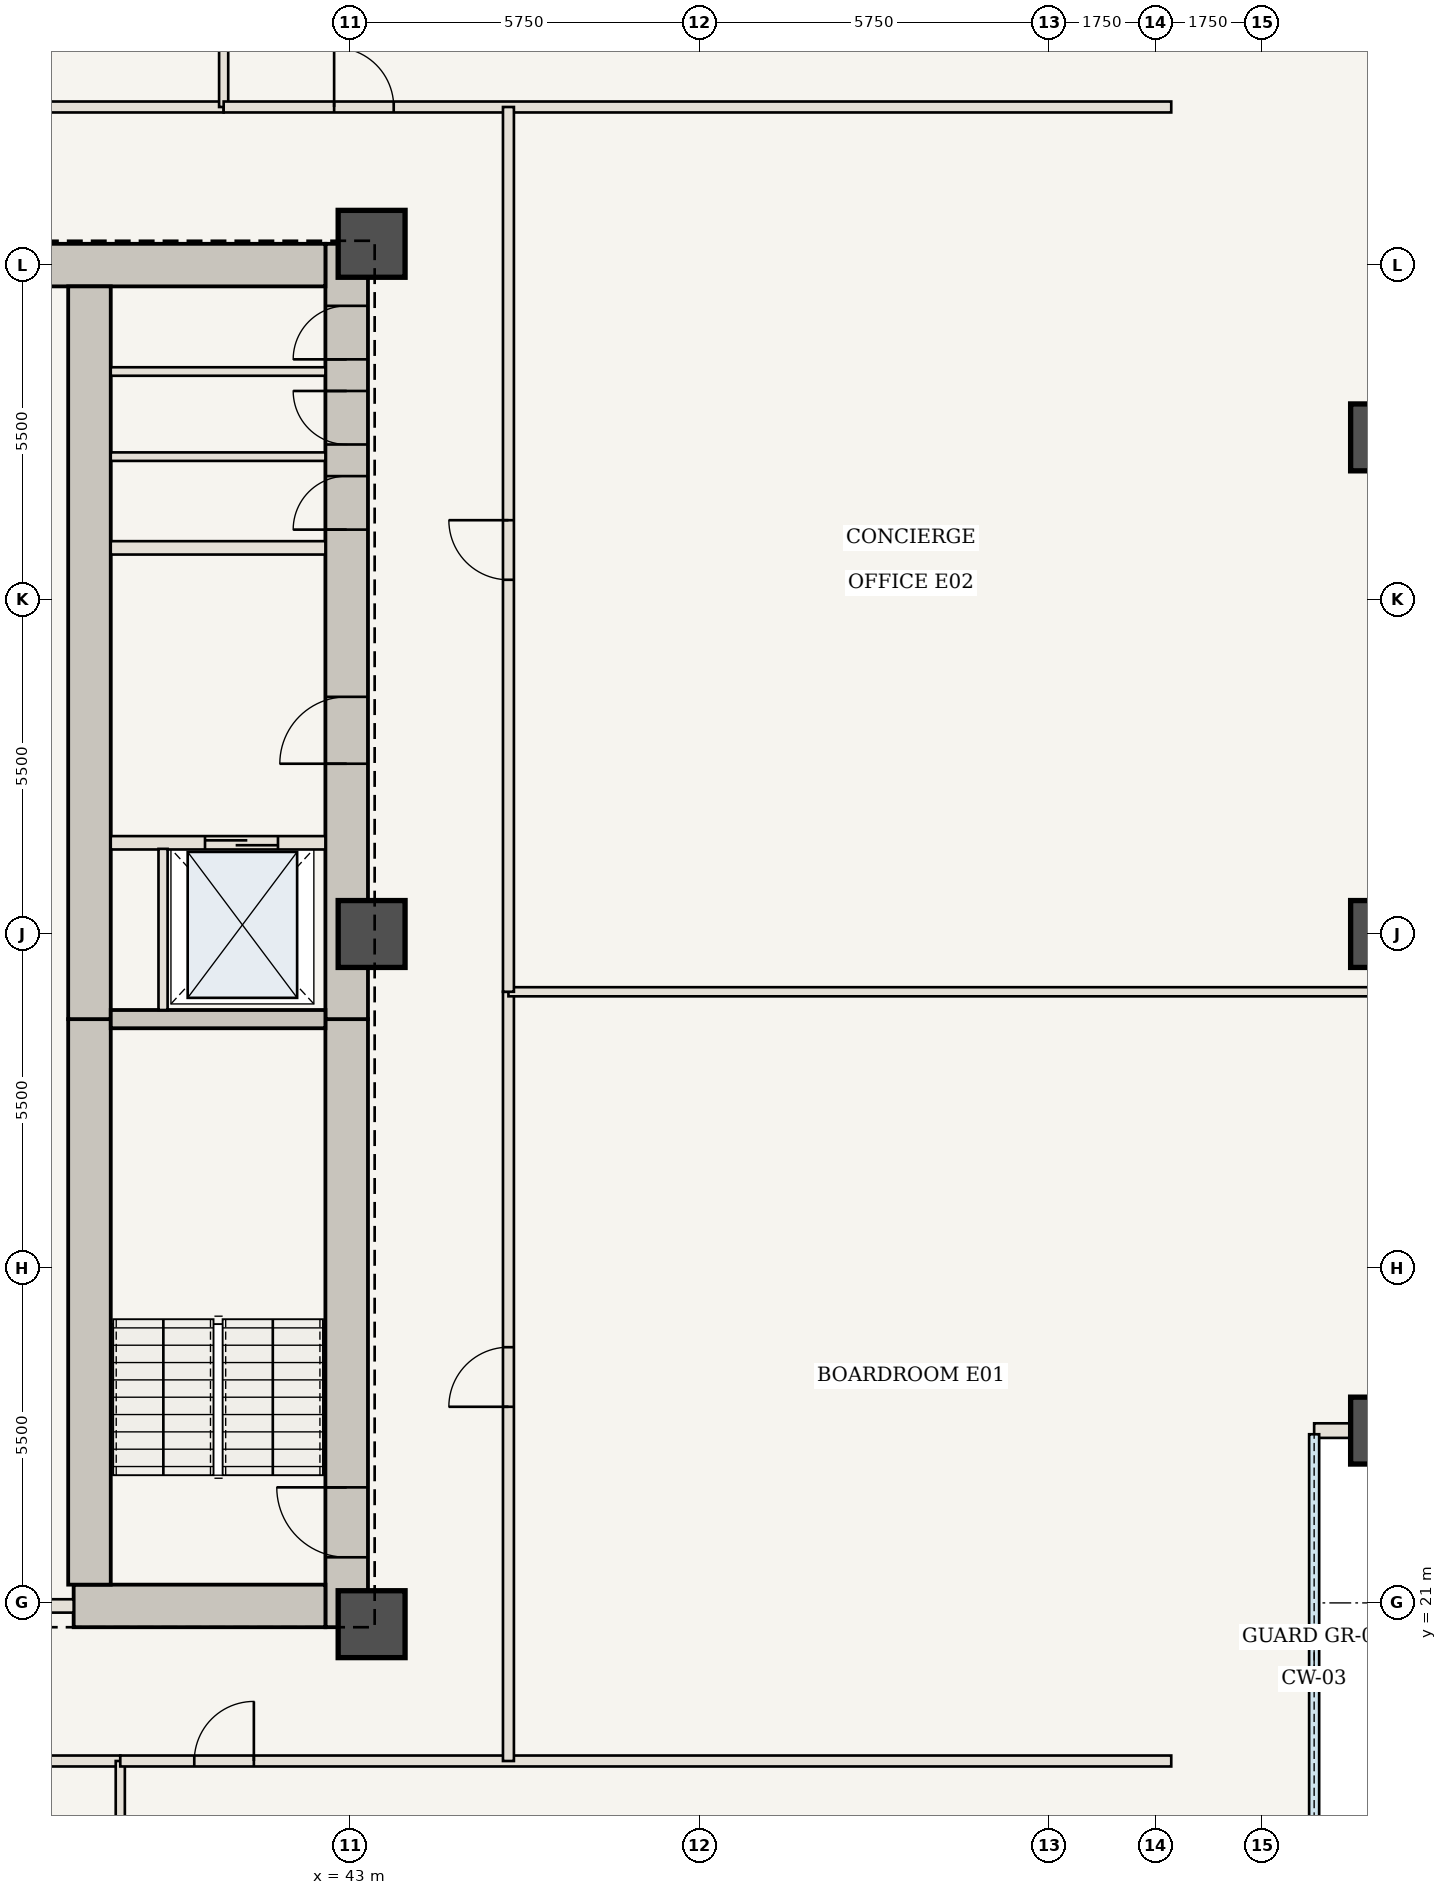
"""IFC4 building model, lengths in metres.
Left out: names, types, materials, properties, quantities, classifications, styles, units other than length and angle.
Written with IfcOpenShell. Run it as: python <this file> out.ifc"""

import sys

from ifc_helpers import new_model, si_unit, direction, frame, frame_2d, origin, origin_2d, place, context, subcontext, project, spatial, rectangle, extrude, element, fill, save


model = new_model("IFC4")
c1 = context("Model", 3, precision=1e-05, world=origin(), true_north=direction((0.0, 1.0)))
c2 = subcontext(c1, "Body", "Model", "MODEL_VIEW")
j1 = project(units=[si_unit("LENGTHUNIT", "METRE"), si_unit("PLANEANGLEUNIT", "RADIAN")], contexts=[c1])
p1 = place(None, origin())
s1 = spatial("IfcSite", under=j1, at=p1, CompositionType="ELEMENT")
p2 = place(p1, origin())
s2 = spatial("IfcBuilding", under=s1, at=p2, CompositionType="ELEMENT")
p3 = place(p2, frame((0.0, 0.0, 96.25)))
s3 = spatial("IfcBuildingStorey", under=s2, at=p3, CompositionType="ELEMENT", Elevation=96.25)
p4 = place(p3, frame((42.94, 20.6, 0.0), z_axis=(0.0, 0.0, 1.0), x_axis=(0.0, 1.0, 0.0)))
e1 = element("IfcWall", 1, at=p4, inside=s3, PredefinedType="SHEAR", context=c2, shape_type="SweptSolid", body=[
    extrude(rectangle(XDim=10.0, YDim=0.7, at=frame_2d((5.0, 0.0))), origin(), (0.0, 0.0, 1.0), 3.5),
])
p5 = place(p4, frame((1.15, 0.0, 0.0)))
e2 = element("IfcOpeningElement", 2, at=p5, cuts=e1, PredefinedType="OPENING", context=c2, shape_type="SweptSolid", body=[
    extrude(rectangle(XDim=1.15, YDim=2.15, at=frame_2d((0.575, 1.075))), frame((0.0, 0.36, 0.0), z_axis=(0.0, -1.0, 0.0), x_axis=(1.0, 0.0, 0.0)), (0.0, 0.0, 1.0), 0.72),
])
p6 = place(p3, frame((42.94, 30.6, 0.0), z_axis=(0.0, 0.0, 1.0), x_axis=(0.0, 1.0, 0.0)))
e3 = element("IfcWall", 3, at=p6, inside=s3, PredefinedType="SHEAR", context=c2, shape_type="SweptSolid", body=[
    extrude(rectangle(XDim=12.75, YDim=0.7, at=frame_2d((6.375, 0.0))), origin(), (0.0, 0.0, 1.0), 3.5),
])
p7 = place(p6, frame((4.2, 0.0, 0.0)))
e4 = element("IfcOpeningElement", 4, at=p7, cuts=e3, PredefinedType="OPENING", context=c2, shape_type="SweptSolid", body=[
    extrude(rectangle(XDim=1.1, YDim=2.15, at=frame_2d((0.55, 1.075))), frame((0.0, 0.36, 0.0), z_axis=(0.0, -1.0, 0.0), x_axis=(1.0, 0.0, 0.0)), (0.0, 0.0, 1.0), 0.72),
])
p8 = place(p6, frame((8.05, 0.0, 0.0)))
e5 = element("IfcOpeningElement", 5, at=p8, cuts=e3, PredefinedType="OPENING", context=c2, shape_type="SweptSolid", body=[
    extrude(rectangle(XDim=0.88, YDim=2.1, at=frame_2d((0.44, 1.05))), frame((0.0, 0.36, 0.0), z_axis=(0.0, -1.0, 0.0), x_axis=(1.0, 0.0, 0.0)), (0.0, 0.0, 1.0), 0.72),
])
p9 = place(p6, frame((9.45, 0.0, 0.0)))
e6 = element("IfcOpeningElement", 6, at=p9, cuts=e3, PredefinedType="OPENING", context=c2, shape_type="SweptSolid", body=[
    extrude(rectangle(XDim=0.88, YDim=2.1, at=frame_2d((0.44, 1.05))), frame((0.0, 0.36, 0.0), z_axis=(0.0, -1.0, 0.0), x_axis=(1.0, 0.0, 0.0)), (0.0, 0.0, 1.0), 0.72),
])
p10 = place(p6, frame((10.85, 0.0, 0.0)))
e7 = element("IfcOpeningElement", 7, at=p10, cuts=e3, PredefinedType="OPENING", context=c2, shape_type="SweptSolid", body=[
    extrude(rectangle(XDim=0.88, YDim=2.1, at=frame_2d((0.44, 1.05))), frame((0.0, 0.36, 0.0), z_axis=(0.0, -1.0, 0.0), x_axis=(1.0, 0.0, 0.0)), (0.0, 0.0, 1.0), 0.72),
])
p11 = place(p3, frame((38.45, 20.95, 0.0), z_axis=(0.0, 0.0, 1.0), x_axis=(1.0, 0.0, 0.0)))
e8 = element("IfcWall", 8, at=p11, inside=s3, PredefinedType="SHEAR", context=c2, shape_type="SweptSolid", body=[
    extrude(rectangle(XDim=4.14, YDim=0.7, at=frame_2d((2.07, 0.0))), origin(), (0.0, 0.0, 1.0), 3.5),
])
p12 = place(p3, frame((37.75, 43.0, 0.0), z_axis=(0.0, 0.0, 1.0), x_axis=(1.0, 0.0, 0.0)))
e9 = element("IfcWall", 9, at=p12, inside=s3, PredefinedType="SHEAR", context=c2, shape_type="SweptSolid", body=[
    extrude(rectangle(XDim=4.84, YDim=0.7, at=frame_2d((2.42, 0.0))), origin(), (0.0, 0.0, 1.0), 3.5),
])
p13 = place(p3, frame((38.71, 21.3, 0.0), z_axis=(0.0, 0.0, 1.0), x_axis=(0.0, 1.0, 0.0)))
e10 = element("IfcWall", 10, at=p13, inside=s3, PredefinedType="SHEAR", context=c2, shape_type="SweptSolid", body=[
    extrude(rectangle(XDim=9.3, YDim=0.7, at=frame_2d((4.65, 0.0))), origin(), (0.0, 0.0, 1.0), 3.5),
])
p14 = place(p3, frame((38.71, 30.6, 0.0), z_axis=(0.0, 0.0, 1.0), x_axis=(0.0, 1.0, 0.0)))
e11 = element("IfcWall", 11, at=p14, inside=s3, PredefinedType="SHEAR", context=c2, shape_type="SweptSolid", body=[
    extrude(rectangle(XDim=12.05, YDim=0.7, at=frame_2d((6.025, 0.0))), origin(), (0.0, 0.0, 1.0), 3.5),
])
for number, where, z_axis, x_axis in (
    (12, (43.35, 20.65, 0.0), (0.0, 0.0, 1.0), (1.0, 0.0, 0.0)),
    (13, (43.35, 32.0, 0.0), (0.0, 0.0, 1.0), (1.0, 0.0, 0.0)),
    (14, (43.35, 43.35, 0.0), (0.0, 0.0, 1.0), (1.0, 0.0, 0.0)),
    (15, (60.0, 23.833, 0.0), (0.0, 0.0, 1.0), (1.0, 0.0, 0.0)),
    (16, (60.0, 32.0, 0.0), (0.0, 0.0, 1.0), (1.0, 0.0, 0.0)),
    (17, (60.0, 40.167, 0.0), (0.0, 0.0, 1.0), (1.0, 0.0, 0.0)),
):
    element("IfcColumn", number, at=place(p3, frame(where, z_axis=z_axis, x_axis=x_axis)), inside=s3, PredefinedType="COLUMN", context=c2, shape_type="SweptSolid", body=[
        extrude(rectangle(XDim=1.1, YDim=1.1, at=origin_2d()), origin(), (0.0, 0.0, 1.0), 3.5),
    ])
p15 = place(p3, frame((39.06, 30.6, 0.0), z_axis=(0.0, 0.0, 1.0), x_axis=(1.0, 0.0, 0.0)))
e18 = element("IfcWall", 18, at=p15, inside=s3, PredefinedType="SHEAR", context=c2, shape_type="SweptSolid", body=[
    extrude(rectangle(XDim=3.53, YDim=0.3, at=frame_2d((1.765, 0.0))), origin(), (0.0, 0.0, 1.0), 3.08),
])
p16 = place(p3, frame((39.06, 33.5, 0.0), z_axis=(0.0, 0.0, 1.0), x_axis=(1.0, 0.0, 0.0)))
e19 = element("IfcWall", 19, at=p16, inside=s3, PredefinedType="STANDARD", context=c2, shape_type="SweptSolid", body=[
    extrude(rectangle(XDim=3.53, YDim=0.22, at=frame_2d((1.765, 0.0))), origin(), (0.0, 0.0, 1.0), 3.08),
])
p17 = place(p16, frame((1.55, 0.0, 0.0)))
e20 = element("IfcOpeningElement", 20, at=p17, cuts=e19, PredefinedType="OPENING", context=c2, shape_type="SweptSolid", body=[
    extrude(rectangle(XDim=1.2, YDim=2.2, at=frame_2d((0.6, 1.1))), frame((0.0, 0.12, 0.0), z_axis=(0.0, -1.0, 0.0), x_axis=(1.0, 0.0, 0.0)), (0.0, 0.0, 1.0), 0.24),
])
p18 = place(p3, frame((39.92, 30.75, 0.0), z_axis=(0.0, 0.0, 1.0), x_axis=(0.0, 1.0, 0.0)))
e21 = element("IfcWall", 21, at=p18, inside=s3, PredefinedType="STANDARD", context=c2, shape_type="SweptSolid", body=[
    extrude(rectangle(XDim=2.65, YDim=0.15, at=frame_2d((1.325, 0.0))), origin(), (0.0, 0.0, 1.0), 3.08),
])
p19 = place(p3, frame((39.06, 38.35, 0.0), z_axis=(0.0, 0.0, 1.0), x_axis=(1.0, 0.0, 0.0)))
e22 = element("IfcWall", 22, at=p19, inside=s3, PredefinedType="STANDARD", context=c2, shape_type="SweptSolid", body=[
    extrude(rectangle(XDim=3.53, YDim=0.22, at=frame_2d((1.765, 0.0))), origin(), (0.0, 0.0, 1.0), 3.08),
])
for number, where, z_axis, x_axis in (
    (23, (39.06, 39.85, 0.0), (0.0, 0.0, 1.0), (1.0, 0.0, 0.0)),
    (24, (39.06, 41.25, 0.0), (0.0, 0.0, 1.0), (1.0, 0.0, 0.0)),
):
    element("IfcWall", number, at=place(p3, frame(where, z_axis=z_axis, x_axis=x_axis)), inside=s3, PredefinedType="STANDARD", context=c2, shape_type="SweptSolid", body=[
        extrude(rectangle(XDim=3.53, YDim=0.14, at=frame_2d((1.765, 0.0))), origin(), (0.0, 0.0, 1.0), 3.08),
    ])
p20 = place(p3, frame((35.15, 20.95, 0.0), z_axis=(0.0, 0.0, 1.0), x_axis=(1.0, 0.0, 0.0)))
e25 = element("IfcWall", 25, at=p20, inside=s3, PredefinedType="STANDARD", context=c2, shape_type="SweptSolid", body=[
    extrude(rectangle(XDim=3.3, YDim=0.22, at=frame_2d((1.65, 0.0))), origin(), (0.0, 0.0, 1.0), 3.08),
])
p21 = place(p20, frame((1.1, 0.0, 0.0)))
e26 = element("IfcOpeningElement", 26, at=p21, cuts=e25, PredefinedType="OPENING", context=c2, shape_type="SweptSolid", body=[
    extrude(rectangle(XDim=1.1, YDim=2.15, at=frame_2d((0.55, 1.075))), frame((0.0, 0.12, 0.0), z_axis=(0.0, -1.0, 0.0), x_axis=(1.0, 0.0, 0.0)), (0.0, 0.0, 1.0), 0.24),
])
p22 = place(p3, frame((7.5, 18.4, 0.0), z_axis=(0.0, 0.0, 1.0), x_axis=(1.0, 0.0, 0.0)))
e27 = element("IfcWall", 27, at=p22, inside=s3, PredefinedType="STANDARD", context=c2, shape_type="SweptSolid", body=[
    extrude(rectangle(XDim=31.717, YDim=0.18, at=frame_2d((15.858, 0.0))), origin(), (0.0, 0.0, 1.0), 3.08),
])
p23 = place(p22, frame((22.283, 0.0, 0.0)))
e28 = element("IfcOpeningElement", 28, at=p23, cuts=e27, PredefinedType="OPENING", context=c2, shape_type="SweptSolid", body=[
    extrude(rectangle(XDim=0.98, YDim=2.2, at=frame_2d((0.49, 1.1))), frame((0.0, 0.1, 0.0), z_axis=(0.0, -1.0, 0.0), x_axis=(1.0, 0.0, 0.0)), (0.0, 0.0, 1.0), 0.2),
])
p24 = place(p3, frame((39.217, 4.06, 0.0), z_axis=(0.0, 0.0, 1.0), x_axis=(0.0, 1.0, 0.0)))
e29 = element("IfcWall", 29, at=p24, inside=s3, PredefinedType="STANDARD", context=c2, shape_type="SweptSolid", body=[
    extrude(rectangle(XDim=14.34, YDim=0.15, at=frame_2d((7.17, 0.0))), origin(), (0.0, 0.0, 1.0), 3.08),
])
p25 = place(p3, frame((39.217, 18.4, 0.0), z_axis=(0.0, 0.0, 1.0), x_axis=(1.0, 0.0, 0.0)))
e30 = element("IfcWall", 30, at=p25, inside=s3, PredefinedType="STANDARD", context=c2, shape_type="SweptSolid", body=[
    extrude(rectangle(XDim=17.283, YDim=0.18, at=frame_2d((8.642, 0.0))), origin(), (0.0, 0.0, 1.0), 3.08),
])
p26 = place(p25, frame((1.217, 0.0, 0.0)))
e31 = element("IfcOpeningElement", 31, at=p26, cuts=e30, PredefinedType="OPENING", context=c2, shape_type="SweptSolid", body=[
    extrude(rectangle(XDim=0.98, YDim=2.2, at=frame_2d((0.49, 1.1))), frame((0.0, 0.1, 0.0), z_axis=(0.0, -1.0, 0.0), x_axis=(1.0, 0.0, 0.0)), (0.0, 0.0, 1.0), 0.2),
])
p27 = place(p3, frame((22.883, 45.6, 0.0), z_axis=(0.0, 0.0, 1.0), x_axis=(1.0, 0.0, 0.0)))
e32 = element("IfcWall", 32, at=p27, inside=s3, PredefinedType="STANDARD", context=c2, shape_type="SweptSolid", body=[
    extrude(rectangle(XDim=18.033, YDim=0.18, at=frame_2d((9.017, 0.0))), origin(), (0.0, 0.0, 1.0), 3.08),
])
p28 = place(p27, frame((9.967, 0.0, 0.0)))
e33 = element("IfcOpeningElement", 33, at=p28, cuts=e32, PredefinedType="OPENING", context=c2, shape_type="SweptSolid", body=[
    extrude(rectangle(XDim=0.98, YDim=2.2, at=frame_2d((0.49, 1.1))), frame((0.0, 0.1, 0.0), z_axis=(0.0, -1.0, 0.0), x_axis=(1.0, 0.0, 0.0)), (0.0, 0.0, 1.0), 0.2),
])
p29 = place(p3, frame((40.917, 45.6, 0.0), z_axis=(0.0, 0.0, 1.0), x_axis=(0.0, 1.0, 0.0)))
e34 = element("IfcWall", 34, at=p29, inside=s3, PredefinedType="STANDARD", context=c2, shape_type="SweptSolid", body=[
    extrude(rectangle(XDim=14.34, YDim=0.15, at=frame_2d((7.17, 0.0))), origin(), (0.0, 0.0, 1.0), 3.08),
])
p30 = place(p3, frame((40.917, 45.6, 0.0), z_axis=(0.0, 0.0, 1.0), x_axis=(1.0, 0.0, 0.0)))
e35 = element("IfcWall", 35, at=p30, inside=s3, PredefinedType="STANDARD", context=c2, shape_type="SweptSolid", body=[
    extrude(rectangle(XDim=15.583, YDim=0.18, at=frame_2d((7.792, 0.0))), origin(), (0.0, 0.0, 1.0), 3.08),
])
p31 = place(p30, frame((1.817, 0.0, 0.0)))
e36 = element("IfcOpeningElement", 36, at=p31, cuts=e35, PredefinedType="OPENING", context=c2, shape_type="SweptSolid", body=[
    extrude(rectangle(XDim=0.98, YDim=2.2, at=frame_2d((0.49, 1.1))), frame((0.0, 0.1, 0.0), z_axis=(0.0, -1.0, 0.0), x_axis=(1.0, 0.0, 0.0)), (0.0, 0.0, 1.0), 0.2),
])
p32 = place(p3, frame((45.6, 18.4, 0.0), z_axis=(0.0, 0.0, 1.0), x_axis=(0.0, 1.0, 0.0)))
e37 = element("IfcWall", 37, at=p32, inside=s3, PredefinedType="STANDARD", context=c2, shape_type="SweptSolid", body=[
    extrude(rectangle(XDim=12.65, YDim=0.18, at=frame_2d((6.325, 0.0))), origin(), (0.0, 0.0, 1.0), 3.08),
])
p33 = place(p32, frame((5.825, 0.0, 0.0)))
e38 = element("IfcOpeningElement", 38, at=p33, cuts=e37, PredefinedType="OPENING", context=c2, shape_type="SweptSolid", body=[
    extrude(rectangle(XDim=0.98, YDim=2.2, at=frame_2d((0.49, 1.1))), frame((0.0, 0.1, 0.0), z_axis=(0.0, -1.0, 0.0), x_axis=(1.0, 0.0, 0.0)), (0.0, 0.0, 1.0), 0.2),
])
p34 = place(p3, frame((45.6, 31.05, 0.0), z_axis=(0.0, 0.0, 1.0), x_axis=(1.0, 0.0, 0.0)))
e39 = element("IfcWall", 39, at=p34, inside=s3, PredefinedType="STANDARD", context=c2, shape_type="SweptSolid", body=[
    extrude(rectangle(XDim=14.34, YDim=0.15, at=frame_2d((7.17, 0.0))), origin(), (0.0, 0.0, 1.0), 3.08),
])
p35 = place(p3, frame((45.6, 31.05, 0.0), z_axis=(0.0, 0.0, 1.0), x_axis=(0.0, 1.0, 0.0)))
e40 = element("IfcWall", 40, at=p35, inside=s3, PredefinedType="STANDARD", context=c2, shape_type="SweptSolid", body=[
    extrude(rectangle(XDim=14.55, YDim=0.18, at=frame_2d((7.275, 0.0))), origin(), (0.0, 0.0, 1.0), 3.08),
])
p36 = place(p35, frame((6.775, 0.0, 0.0)))
e41 = element("IfcOpeningElement", 41, at=p36, cuts=e40, PredefinedType="OPENING", context=c2, shape_type="SweptSolid", body=[
    extrude(rectangle(XDim=0.98, YDim=2.2, at=frame_2d((0.49, 1.1))), frame((0.0, 0.1, 0.0), z_axis=(0.0, -1.0, 0.0), x_axis=(1.0, 0.0, 0.0)), (0.0, 0.0, 1.0), 0.2),
])
p37 = place(p3, frame((60.0, 23.833, 0.0), z_axis=(0.0, 0.0, 1.0), x_axis=(-1.0, 0.0, 0.0)))
e42 = element("IfcWall", 42, at=p37, inside=s3, PredefinedType="USERDEFINED", context=c2, shape_type="SweptSolid", body=[
    extrude(rectangle(XDim=1.15, YDim=0.24, at=frame_2d((0.575, 0.0))), origin(), (0.0, 0.0, 1.0), 2.28),
])
p38 = place(p5, origin())
e43 = element("IfcDoor", 43, at=p38, inside=s3, OperationType="SINGLE_SWING_RIGHT", PredefinedType="DOOR", context=c2, shape_type="SweptSolid", body=[
    extrude(rectangle(XDim=1.15, YDim=2.15, at=frame_2d((0.575, 1.075))), frame((0.0, 0.025, 0.0), z_axis=(0.0, -1.0, 0.0), x_axis=(1.0, 0.0, 0.0)), (0.0, 0.0, 1.0), 0.05),
])
fill(e2, e43)
p39 = place(p7, origin())
e44 = element("IfcDoor", 44, at=p39, inside=s3, OperationType="SINGLE_SWING_LEFT", PredefinedType="DOOR", context=c2, shape_type="SweptSolid", body=[
    extrude(rectangle(XDim=1.1, YDim=2.15, at=frame_2d((0.55, 1.075))), frame((0.0, 0.025, 0.0), z_axis=(0.0, -1.0, 0.0), x_axis=(1.0, 0.0, 0.0)), (0.0, 0.0, 1.0), 0.05),
])
fill(e4, e44)
p40 = place(p8, origin())
e45 = element("IfcDoor", 45, at=p40, inside=s3, OperationType="SINGLE_SWING_LEFT", PredefinedType="DOOR", context=c2, shape_type="SweptSolid", body=[
    extrude(rectangle(XDim=0.88, YDim=2.1, at=frame_2d((0.44, 1.05))), frame((0.0, 0.025, 0.0), z_axis=(0.0, -1.0, 0.0), x_axis=(1.0, 0.0, 0.0)), (0.0, 0.0, 1.0), 0.05),
])
fill(e5, e45)
p41 = place(p9, origin())
e46 = element("IfcDoor", 46, at=p41, inside=s3, OperationType="SINGLE_SWING_RIGHT", PredefinedType="DOOR", context=c2, shape_type="SweptSolid", body=[
    extrude(rectangle(XDim=0.88, YDim=2.1, at=frame_2d((0.44, 1.05))), frame((0.0, 0.025, 0.0), z_axis=(0.0, -1.0, 0.0), x_axis=(1.0, 0.0, 0.0)), (0.0, 0.0, 1.0), 0.05),
])
fill(e6, e46)
p42 = place(p10, origin())
e47 = element("IfcDoor", 47, at=p42, inside=s3, OperationType="SINGLE_SWING_LEFT", PredefinedType="DOOR", context=c2, shape_type="SweptSolid", body=[
    extrude(rectangle(XDim=0.88, YDim=2.1, at=frame_2d((0.44, 1.05))), frame((0.0, 0.025, 0.0), z_axis=(0.0, -1.0, 0.0), x_axis=(1.0, 0.0, 0.0)), (0.0, 0.0, 1.0), 0.05),
])
fill(e7, e47)
p43 = place(p17, origin())
e48 = element("IfcDoor", 48, at=p43, inside=s3, OperationType="DOUBLE_DOOR_SLIDING", PredefinedType="DOOR", context=c2, shape_type="SweptSolid", body=[
    extrude(rectangle(XDim=1.2, YDim=2.2, at=frame_2d((0.6, 1.1))), frame((0.0, 0.025, 0.0), z_axis=(0.0, -1.0, 0.0), x_axis=(1.0, 0.0, 0.0)), (0.0, 0.0, 1.0), 0.05),
])
fill(e20, e48)
p44 = place(p26, origin())
e49 = element("IfcDoor", 49, at=p44, inside=s3, OperationType="SINGLE_SWING_RIGHT", PredefinedType="DOOR", context=c2, shape_type="SweptSolid", body=[
    extrude(rectangle(XDim=0.98, YDim=2.2, at=frame_2d((0.49, 1.1))), frame((0.0, 0.025, 0.0), z_axis=(0.0, -1.0, 0.0), x_axis=(1.0, 0.0, 0.0)), (0.0, 0.0, 1.0), 0.05),
])
fill(e31, e49)
p45 = place(p31, origin())
e50 = element("IfcDoor", 50, at=p45, inside=s3, OperationType="SINGLE_SWING_LEFT", PredefinedType="DOOR", context=c2, shape_type="SweptSolid", body=[
    extrude(rectangle(XDim=0.98, YDim=2.2, at=frame_2d((0.49, 1.1))), frame((0.0, 0.025, 0.0), z_axis=(0.0, -1.0, 0.0), x_axis=(1.0, 0.0, 0.0)), (0.0, 0.0, 1.0), 0.05),
])
fill(e36, e50)
p46 = place(p33, origin())
e51 = element("IfcDoor", 51, at=p46, inside=s3, OperationType="SINGLE_SWING_LEFT", PredefinedType="DOOR", context=c2, shape_type="SweptSolid", body=[
    extrude(rectangle(XDim=0.98, YDim=2.2, at=frame_2d((0.49, 1.1))), frame((0.0, 0.025, 0.0), z_axis=(0.0, -1.0, 0.0), x_axis=(1.0, 0.0, 0.0)), (0.0, 0.0, 1.0), 0.05),
])
fill(e38, e51)
p47 = place(p36, origin())
e52 = element("IfcDoor", 52, at=p47, inside=s3, OperationType="SINGLE_SWING_RIGHT", PredefinedType="DOOR", context=c2, shape_type="SweptSolid", body=[
    extrude(rectangle(XDim=0.98, YDim=2.2, at=frame_2d((0.49, 1.1))), frame((0.0, 0.025, 0.0), z_axis=(0.0, -1.0, 0.0), x_axis=(1.0, 0.0, 0.0)), (0.0, 0.0, 1.0), 0.05),
])
fill(e41, e52)
save(model, sys.argv[1])
